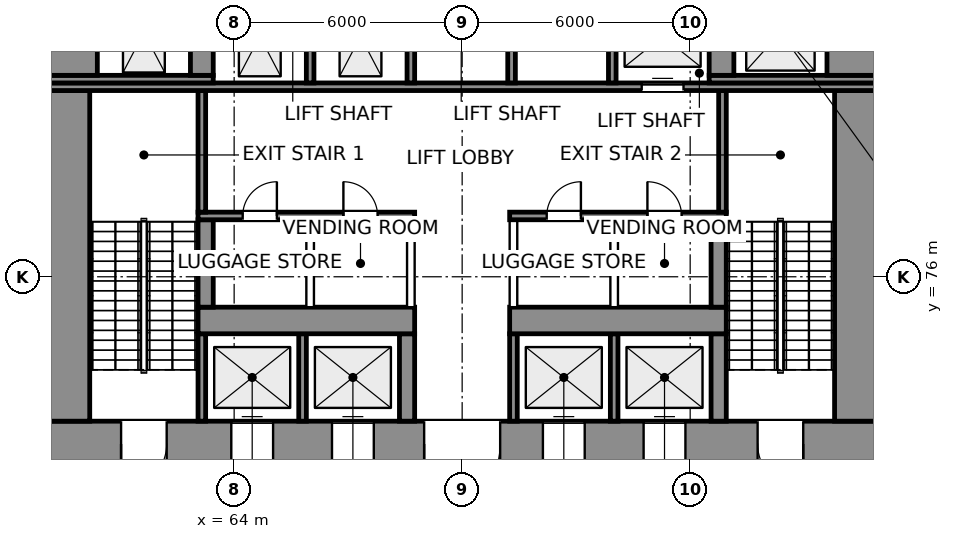
"""IFC4 building model, lengths in metres.
Left out: names, types, materials, properties, quantities, classifications, styles, units other than length and angle.
Written with IfcOpenShell. Run it as: python <this file> out.ifc"""

import sys

from ifc_helpers import new_model, si_unit, direction, frame, frame_2d, origin, place, context, subcontext, project, spatial, rectangle, extrude, element, fill, save


model = new_model("IFC4")
c1 = context("Model", 3, precision=1e-05, world=origin(), true_north=direction((0.0, 1.0)))
c2 = subcontext(c1, "Body", "Model", "MODEL_VIEW")
j1 = project(units=[si_unit("LENGTHUNIT", "METRE"), si_unit("PLANEANGLEUNIT", "RADIAN")], contexts=[c1])
p1 = place(None, origin())
s1 = spatial("IfcSite", under=j1, at=p1, CompositionType="ELEMENT")
p2 = place(p1, origin())
s2 = spatial("IfcBuilding", under=s1, at=p2, CompositionType="ELEMENT")
p3 = place(p2, frame((0.0, 0.0, 23.0)))
s3 = spatial("IfcBuildingStorey", under=s2, at=p3, CompositionType="ELEMENT", Elevation=23.0)
p4 = place(p3, frame((59.0, 71.6, 0.0), z_axis=(0.0, 0.0, 1.0), x_axis=(1.0, 0.0, 0.0)))
e1 = element("IfcWall", 1, at=p4, inside=s3, PredefinedType="SHEAR", context=c2, shape_type="SweptSolid", body=[
    extrude(rectangle(XDim=22.0, YDim=1.2, at=frame_2d((11.0, 0.0))), origin(), (0.0, 0.0, 1.0), 6.0),
])
p5 = place(p4, frame((2.025, 0.0, 0.0)))
e2 = element("IfcOpeningElement", 2, at=p5, cuts=e1, PredefinedType="OPENING", context=c2, shape_type="SweptSolid", body=[
    extrude(rectangle(XDim=1.2, YDim=2.1, at=frame_2d((0.6, 1.05))), frame((0.0, 0.61, 0.0), z_axis=(0.0, -1.0, 0.0), x_axis=(1.0, 0.0, 0.0)), (0.0, 0.0, 1.0), 1.22),
])
p6 = place(p4, frame((18.775, 0.0, 0.0)))
e3 = element("IfcOpeningElement", 3, at=p6, cuts=e1, PredefinedType="OPENING", context=c2, shape_type="SweptSolid", body=[
    extrude(rectangle(XDim=1.2, YDim=2.1, at=frame_2d((0.6, 1.05))), frame((0.0, 0.61, 0.0), z_axis=(0.0, -1.0, 0.0), x_axis=(1.0, 0.0, 0.0)), (0.0, 0.0, 1.0), 1.22),
])
p7 = place(p4, frame((10.0, 0.0, 0.0)))
e4 = element("IfcOpeningElement", 4, at=p7, cuts=e1, PredefinedType="OPENING", context=c2, shape_type="SweptSolid", body=[
    extrude(rectangle(XDim=2.0, YDim=2.1, at=frame_2d((1.0, 1.05))), frame((0.0, 0.61, 0.0), z_axis=(0.0, -1.0, 0.0), x_axis=(1.0, 0.0, 0.0)), (0.0, 0.0, 1.0), 1.22),
])
p8 = place(p4, frame((4.925, 0.0, 0.0)))
e5 = element("IfcOpeningElement", 5, at=p8, cuts=e1, PredefinedType="OPENING", context=c2, shape_type="SweptSolid", body=[
    extrude(rectangle(XDim=1.1, YDim=2.1, at=frame_2d((0.55, 1.05))), frame((0.0, 0.61, 0.0), z_axis=(0.0, -1.0, 0.0), x_axis=(1.0, 0.0, 0.0)), (0.0, 0.0, 1.0), 1.22),
])
p9 = place(p4, frame((7.575, 0.0, 0.0)))
e6 = element("IfcOpeningElement", 6, at=p9, cuts=e1, PredefinedType="OPENING", context=c2, shape_type="SweptSolid", body=[
    extrude(rectangle(XDim=1.1, YDim=2.1, at=frame_2d((0.55, 1.05))), frame((0.0, 0.61, 0.0), z_axis=(0.0, -1.0, 0.0), x_axis=(1.0, 0.0, 0.0)), (0.0, 0.0, 1.0), 1.22),
])
p10 = place(p4, frame((13.125, 0.0, 0.0)))
e7 = element("IfcOpeningElement", 7, at=p10, cuts=e1, PredefinedType="OPENING", context=c2, shape_type="SweptSolid", body=[
    extrude(rectangle(XDim=1.1, YDim=2.1, at=frame_2d((0.55, 1.05))), frame((0.0, 0.61, 0.0), z_axis=(0.0, -1.0, 0.0), x_axis=(1.0, 0.0, 0.0)), (0.0, 0.0, 1.0), 1.22),
])
p11 = place(p4, frame((15.775, 0.0, 0.0)))
e8 = element("IfcOpeningElement", 8, at=p11, cuts=e1, PredefinedType="OPENING", context=c2, shape_type="SweptSolid", body=[
    extrude(rectangle(XDim=1.1, YDim=2.1, at=frame_2d((0.55, 1.05))), frame((0.0, 0.61, 0.0), z_axis=(0.0, -1.0, 0.0), x_axis=(1.0, 0.0, 0.0)), (0.0, 0.0, 1.0), 1.22),
])
p12 = place(p3, frame((59.6, 72.2, 0.0), z_axis=(0.0, 0.0, 1.0), x_axis=(0.0, 1.0, 0.0)))
e9 = element("IfcWall", 9, at=p12, inside=s3, PredefinedType="SHEAR", context=c2, shape_type="SweptSolid", body=[
    extrude(rectangle(XDim=8.7, YDim=1.2, at=frame_2d((4.35, 0.0))), origin(), (0.0, 0.0, 1.0), 6.0),
])
for number, where, z_axis, x_axis in (
    (10, (63.15, 72.2, 0.0), (0.0, 0.0, 1.0), (0.0, 1.0, 0.0)),
    (11, (65.8, 72.2, 0.0), (0.0, 0.0, 1.0), (0.0, 1.0, 0.0)),
):
    element("IfcWall", number, at=place(p3, frame(where, z_axis=z_axis, x_axis=x_axis)), inside=s3, PredefinedType="SHEAR", context=c2, shape_type="SweptSolid", body=[
        extrude(rectangle(XDim=2.3, YDim=0.2, at=frame_2d((1.15, 0.0))), origin(), (0.0, 0.0, 1.0), 6.0),
    ])
p13 = place(p3, frame((68.55, 72.2, 0.0), z_axis=(0.0, 0.0, 1.0), x_axis=(0.0, 1.0, 0.0)))
e12 = element("IfcWall", 12, at=p13, inside=s3, PredefinedType="SHEAR", context=c2, shape_type="SweptSolid", body=[
    extrude(rectangle(XDim=2.3, YDim=0.4, at=frame_2d((1.15, 0.0))), origin(), (0.0, 0.0, 1.0), 6.0),
])
for number, where, z_axis, x_axis in (
    (13, (71.35, 72.2, 0.0), (0.0, 0.0, 1.0), (0.0, 1.0, 0.0)),
    (14, (74.0, 72.2, 0.0), (0.0, 0.0, 1.0), (0.0, 1.0, 0.0)),
):
    element("IfcWall", number, at=place(p3, frame(where, z_axis=z_axis, x_axis=x_axis)), inside=s3, PredefinedType="SHEAR", context=c2, shape_type="SweptSolid", body=[
        extrude(rectangle(XDim=2.3, YDim=0.2, at=frame_2d((1.15, 0.0))), origin(), (0.0, 0.0, 1.0), 6.0),
    ])
p14 = place(p3, frame((76.75, 72.2, 0.0), z_axis=(0.0, 0.0, 1.0), x_axis=(0.0, 1.0, 0.0)))
e15 = element("IfcWall", 15, at=p14, inside=s3, PredefinedType="SHEAR", context=c2, shape_type="SweptSolid", body=[
    extrude(rectangle(XDim=2.3, YDim=0.4, at=frame_2d((1.15, 0.0))), origin(), (0.0, 0.0, 1.0), 6.0),
])
p15 = place(p3, frame((80.4, 72.2, 0.0), z_axis=(0.0, 0.0, 1.0), x_axis=(0.0, 1.0, 0.0)))
e16 = element("IfcWall", 16, at=p15, inside=s3, PredefinedType="SHEAR", context=c2, shape_type="SweptSolid", body=[
    extrude(rectangle(XDim=8.7, YDim=1.2, at=frame_2d((4.35, 0.0))), origin(), (0.0, 0.0, 1.0), 6.0),
])
for number, where, z_axis, x_axis in (
    (17, (63.05, 74.85, 0.0), (0.0, 0.0, 1.0), (1.0, 0.0, 0.0)),
    (18, (71.25, 74.85, 0.0), (0.0, 0.0, 1.0), (1.0, 0.0, 0.0)),
):
    element("IfcWall", number, at=place(p3, frame(where, z_axis=z_axis, x_axis=x_axis)), inside=s3, PredefinedType="SHEAR", context=c2, shape_type="SweptSolid", body=[
        extrude(rectangle(XDim=5.7, YDim=0.7, at=frame_2d((2.85, 0.0))), origin(), (0.0, 0.0, 1.0), 6.0),
    ])
p16 = place(p3, frame((63.25, 75.2, 0.0), z_axis=(0.0, 0.0, 1.0), x_axis=(0.0, 1.0, 0.0)))
e19 = element("IfcWall", 19, at=p16, inside=s3, PredefinedType="SHEAR", context=c2, shape_type="SweptSolid", body=[
    extrude(rectangle(XDim=2.3, YDim=0.4, at=frame_2d((1.15, 0.0))), origin(), (0.0, 0.0, 1.0), 6.0),
])
for number, where, z_axis, x_axis in (
    (20, (66.0, 75.2, 0.0), (0.0, 0.0, 1.0), (0.0, 1.0, 0.0)),
    (21, (68.65, 75.2, 0.0), (0.0, 0.0, 1.0), (0.0, 1.0, 0.0)),
    (22, (71.35, 75.2, 0.0), (0.0, 0.0, 1.0), (0.0, 1.0, 0.0)),
    (23, (74.0, 75.2, 0.0), (0.0, 0.0, 1.0), (0.0, 1.0, 0.0)),
):
    element("IfcWall", number, at=place(p3, frame(where, z_axis=z_axis, x_axis=x_axis)), inside=s3, PredefinedType="PARTITIONING", context=c2, shape_type="SweptSolid", body=[
        extrude(rectangle(XDim=2.3, YDim=0.2, at=frame_2d((1.15, 0.0))), origin(), (0.0, 0.0, 1.0), 5.65),
    ])
p17 = place(p3, frame((76.75, 75.2, 0.0), z_axis=(0.0, 0.0, 1.0), x_axis=(0.0, 1.0, 0.0)))
e24 = element("IfcWall", 24, at=p17, inside=s3, PredefinedType="SHEAR", context=c2, shape_type="SweptSolid", body=[
    extrude(rectangle(XDim=2.3, YDim=0.4, at=frame_2d((1.15, 0.0))), origin(), (0.0, 0.0, 1.0), 6.0),
])
p18 = place(p3, frame((63.05, 77.6, 0.0), z_axis=(0.0, 0.0, 1.0), x_axis=(1.0, 0.0, 0.0)))
e25 = element("IfcWall", 25, at=p18, inside=s3, PredefinedType="SHEAR", context=c2, shape_type="SweptSolid", body=[
    extrude(rectangle(XDim=5.7, YDim=0.2, at=frame_2d((2.85, 0.0))), origin(), (0.0, 0.0, 1.0), 6.0),
])
p19 = place(p18, frame((1.175, 0.0, 0.0)))
e26 = element("IfcOpeningElement", 26, at=p19, cuts=e25, PredefinedType="OPENING", context=c2, shape_type="SweptSolid", body=[
    extrude(rectangle(XDim=0.9, YDim=2.1, at=frame_2d((0.45, 1.05))), frame((0.0, 0.11, 0.0), z_axis=(0.0, -1.0, 0.0), x_axis=(1.0, 0.0, 0.0)), (0.0, 0.0, 1.0), 0.22),
])
p20 = place(p18, frame((3.825, 0.0, 0.0)))
e27 = element("IfcOpeningElement", 27, at=p20, cuts=e25, PredefinedType="OPENING", context=c2, shape_type="SweptSolid", body=[
    extrude(rectangle(XDim=0.9, YDim=2.1, at=frame_2d((0.45, 1.05))), frame((0.0, 0.11, 0.0), z_axis=(0.0, -1.0, 0.0), x_axis=(1.0, 0.0, 0.0)), (0.0, 0.0, 1.0), 0.22),
])
p21 = place(p3, frame((71.25, 77.6, 0.0), z_axis=(0.0, 0.0, 1.0), x_axis=(1.0, 0.0, 0.0)))
e28 = element("IfcWall", 28, at=p21, inside=s3, PredefinedType="SHEAR", context=c2, shape_type="SweptSolid", body=[
    extrude(rectangle(XDim=5.7, YDim=0.2, at=frame_2d((2.85, 0.0))), origin(), (0.0, 0.0, 1.0), 6.0),
])
p22 = place(p21, frame((0.975, 0.0, 0.0)))
e29 = element("IfcOpeningElement", 29, at=p22, cuts=e28, PredefinedType="OPENING", context=c2, shape_type="SweptSolid", body=[
    extrude(rectangle(XDim=0.9, YDim=2.1, at=frame_2d((0.45, 1.05))), frame((0.0, 0.11, 0.0), z_axis=(0.0, -1.0, 0.0), x_axis=(1.0, 0.0, 0.0)), (0.0, 0.0, 1.0), 0.22),
])
p23 = place(p21, frame((3.625, 0.0, 0.0)))
e30 = element("IfcOpeningElement", 30, at=p23, cuts=e28, PredefinedType="OPENING", context=c2, shape_type="SweptSolid", body=[
    extrude(rectangle(XDim=0.9, YDim=2.1, at=frame_2d((0.45, 1.05))), frame((0.0, 0.11, 0.0), z_axis=(0.0, -1.0, 0.0), x_axis=(1.0, 0.0, 0.0)), (0.0, 0.0, 1.0), 0.22),
])
for number, where, z_axis, x_axis in (
    (31, (63.15, 77.7, 0.0), (0.0, 0.0, 1.0), (0.0, 1.0, 0.0)),
    (32, (76.85, 77.7, 0.0), (0.0, 0.0, 1.0), (0.0, 1.0, 0.0)),
):
    element("IfcWall", number, at=place(p3, frame(where, z_axis=z_axis, x_axis=x_axis)), inside=s3, PredefinedType="SHEAR", context=c2, shape_type="SweptSolid", body=[
        extrude(rectangle(XDim=3.2, YDim=0.2, at=frame_2d((1.6, 0.0))), origin(), (0.0, 0.0, 1.0), 6.0),
    ])
p24 = place(p3, frame((59.0, 81.0, 0.0), z_axis=(0.0, 0.0, 1.0), x_axis=(1.0, 0.0, 0.0)))
e33 = element("IfcWall", 33, at=p24, inside=s3, PredefinedType="SHEAR", context=c2, shape_type="SweptSolid", body=[
    extrude(rectangle(XDim=22.0, YDim=0.2, at=frame_2d((11.0, 0.0))), origin(), (0.0, 0.0, 1.0), 6.0),
])
p25 = place(p24, frame((15.725, 0.0, 0.0)))
e34 = element("IfcOpeningElement", 34, at=p25, cuts=e33, PredefinedType="OPENING", context=c2, shape_type="SweptSolid", body=[
    extrude(rectangle(XDim=1.1, YDim=2.1, at=frame_2d((0.55, 1.05))), frame((0.0, 0.11, 0.0), z_axis=(0.0, -1.0, 0.0), x_axis=(1.0, 0.0, 0.0)), (0.0, 0.0, 1.0), 0.22),
])
p26 = place(p3, frame((59.0, 81.2, 0.0), z_axis=(0.0, 0.0, 1.0), x_axis=(1.0, 0.0, 0.0)))
e35 = element("IfcWall", 35, at=p26, inside=s3, PredefinedType="SHEAR", context=c2, shape_type="SweptSolid", body=[
    extrude(rectangle(XDim=4.45, YDim=0.2, at=frame_2d((2.225, 0.0))), origin(), (0.0, 0.0, 1.0), 6.0),
])
for number, where, z_axis, x_axis in (
    (36, (66.0, 81.1, 0.0), (0.0, 0.0, 1.0), (0.0, 1.0, 0.0)),
    (37, (68.65, 81.1, 0.0), (0.0, 0.0, 1.0), (0.0, 1.0, 0.0)),
    (38, (71.3, 81.1, 0.0), (0.0, 0.0, 1.0), (0.0, 1.0, 0.0)),
    (39, (73.95, 81.1, 0.0), (0.0, 0.0, 1.0), (0.0, 1.0, 0.0)),
):
    element("IfcWall", number, at=place(p3, frame(where, z_axis=z_axis, x_axis=x_axis)), inside=s3, PredefinedType="SHEAR", context=c2, shape_type="SweptSolid", body=[
        extrude(rectangle(XDim=2.45, YDim=0.2, at=frame_2d((1.225, 0.0))), origin(), (0.0, 0.0, 1.0), 6.0),
    ])
p27 = place(p3, frame((76.5, 81.2, 0.0), z_axis=(0.0, 0.0, 1.0), x_axis=(1.0, 0.0, 0.0)))
e40 = element("IfcWall", 40, at=p27, inside=s3, PredefinedType="SHEAR", context=c2, shape_type="SweptSolid", body=[
    extrude(rectangle(XDim=4.5, YDim=0.2, at=frame_2d((2.25, 0.0))), origin(), (0.0, 0.0, 1.0), 6.0),
])
p28 = place(p3, frame((59.7, 81.3, 0.0), z_axis=(0.0, 0.0, 1.0), x_axis=(0.0, 1.0, 0.0)))
e41 = element("IfcWall", 41, at=p28, inside=s3, PredefinedType="SHEAR", context=c2, shape_type="SweptSolid", body=[
    extrude(rectangle(XDim=2.25, YDim=1.4, at=frame_2d((1.125, 0.0))), origin(), (0.0, 0.0, 1.0), 6.0),
])
p29 = place(p3, frame((63.15, 81.3, 0.0), z_axis=(0.0, 0.0, 1.0), x_axis=(0.0, 1.0, 0.0)))
e42 = element("IfcWall", 42, at=p29, inside=s3, PredefinedType="SHEAR", context=c2, shape_type="SweptSolid", body=[
    extrude(rectangle(XDim=2.25, YDim=0.6, at=frame_2d((1.125, 0.0))), origin(), (0.0, 0.0, 1.0), 6.0),
])
p30 = place(p3, frame((76.825, 81.3, 0.0), z_axis=(0.0, 0.0, 1.0), x_axis=(0.0, 1.0, 0.0)))
e43 = element("IfcWall", 43, at=p30, inside=s3, PredefinedType="SHEAR", context=c2, shape_type="SweptSolid", body=[
    extrude(rectangle(XDim=2.25, YDim=0.65, at=frame_2d((1.125, 0.0))), origin(), (0.0, 0.0, 1.0), 6.0),
])
p31 = place(p3, frame((80.3, 81.3, 0.0), z_axis=(0.0, 0.0, 1.0), x_axis=(0.0, 1.0, 0.0)))
e44 = element("IfcWall", 44, at=p31, inside=s3, PredefinedType="SHEAR", context=c2, shape_type="SweptSolid", body=[
    extrude(rectangle(XDim=2.25, YDim=1.4, at=frame_2d((1.125, 0.0))), origin(), (0.0, 0.0, 1.0), 6.0),
])
p32 = place(p5, frame((1.2, 0.0, 0.0), z_axis=(0.0, 0.0, 1.0), x_axis=(-1.0, 0.0, 0.0)))
e45 = element("IfcDoor", 45, at=p32, inside=s3, OperationType="SINGLE_SWING_RIGHT", PredefinedType="DOOR", context=c2, shape_type="SweptSolid", body=[
    extrude(rectangle(XDim=1.2, YDim=2.1, at=frame_2d((0.6, 1.05))), frame((0.0, 0.025, 0.0), z_axis=(0.0, -1.0, 0.0), x_axis=(1.0, 0.0, 0.0)), (0.0, 0.0, 1.0), 0.05),
])
fill(e2, e45)
p33 = place(p6, frame((1.2, 0.0, 0.0), z_axis=(0.0, 0.0, 1.0), x_axis=(-1.0, 0.0, 0.0)))
e46 = element("IfcDoor", 46, at=p33, inside=s3, OperationType="SINGLE_SWING_LEFT", PredefinedType="DOOR", context=c2, shape_type="SweptSolid", body=[
    extrude(rectangle(XDim=1.2, YDim=2.1, at=frame_2d((0.6, 1.05))), frame((0.0, 0.025, 0.0), z_axis=(0.0, -1.0, 0.0), x_axis=(1.0, 0.0, 0.0)), (0.0, 0.0, 1.0), 0.05),
])
fill(e3, e46)
p34 = place(p7, frame((2.0, 0.0, 0.0), z_axis=(0.0, 0.0, 1.0), x_axis=(-1.0, 0.0, 0.0)))
e47 = element("IfcDoor", 47, at=p34, inside=s3, OperationType="DOUBLE_DOOR_SINGLE_SWING", PredefinedType="DOOR", context=c2, shape_type="SweptSolid", body=[
    extrude(rectangle(XDim=2.0, YDim=2.1, at=frame_2d((1.0, 1.05))), frame((0.0, 0.025, 0.0), z_axis=(0.0, -1.0, 0.0), x_axis=(1.0, 0.0, 0.0)), (0.0, 0.0, 1.0), 0.05),
])
fill(e4, e47)
p35 = place(p25, origin())
e48 = element("IfcDoor", 48, at=p35, inside=s3, OperationType="DOUBLE_DOOR_SLIDING", PredefinedType="DOOR", context=c2, shape_type="SweptSolid", body=[
    extrude(rectangle(XDim=1.1, YDim=2.1, at=frame_2d((0.55, 1.05))), frame((0.0, 0.025, 0.0), z_axis=(0.0, -1.0, 0.0), x_axis=(1.0, 0.0, 0.0)), (0.0, 0.0, 1.0), 0.05),
])
fill(e34, e48)
p36 = place(p8, origin())
e49 = element("IfcDoor", 49, at=p36, inside=s3, OperationType="DOUBLE_DOOR_SLIDING", PredefinedType="DOOR", context=c2, shape_type="SweptSolid", body=[
    extrude(rectangle(XDim=1.1, YDim=2.1, at=frame_2d((0.55, 1.05))), frame((0.0, 0.025, 0.0), z_axis=(0.0, -1.0, 0.0), x_axis=(1.0, 0.0, 0.0)), (0.0, 0.0, 1.0), 0.05),
])
fill(e5, e49)
p37 = place(p9, origin())
e50 = element("IfcDoor", 50, at=p37, inside=s3, OperationType="DOUBLE_DOOR_SLIDING", PredefinedType="DOOR", context=c2, shape_type="SweptSolid", body=[
    extrude(rectangle(XDim=1.1, YDim=2.1, at=frame_2d((0.55, 1.05))), frame((0.0, 0.025, 0.0), z_axis=(0.0, -1.0, 0.0), x_axis=(1.0, 0.0, 0.0)), (0.0, 0.0, 1.0), 0.05),
])
fill(e6, e50)
p38 = place(p10, origin())
e51 = element("IfcDoor", 51, at=p38, inside=s3, OperationType="DOUBLE_DOOR_SLIDING", PredefinedType="DOOR", context=c2, shape_type="SweptSolid", body=[
    extrude(rectangle(XDim=1.1, YDim=2.1, at=frame_2d((0.55, 1.05))), frame((0.0, 0.025, 0.0), z_axis=(0.0, -1.0, 0.0), x_axis=(1.0, 0.0, 0.0)), (0.0, 0.0, 1.0), 0.05),
])
fill(e7, e51)
p39 = place(p11, origin())
e52 = element("IfcDoor", 52, at=p39, inside=s3, OperationType="DOUBLE_DOOR_SLIDING", PredefinedType="DOOR", context=c2, shape_type="SweptSolid", body=[
    extrude(rectangle(XDim=1.1, YDim=2.1, at=frame_2d((0.55, 1.05))), frame((0.0, 0.025, 0.0), z_axis=(0.0, -1.0, 0.0), x_axis=(1.0, 0.0, 0.0)), (0.0, 0.0, 1.0), 0.05),
])
fill(e8, e52)
p40 = place(p19, origin())
e53 = element("IfcDoor", 53, at=p40, inside=s3, OperationType="SINGLE_SWING_RIGHT", PredefinedType="DOOR", context=c2, shape_type="SweptSolid", body=[
    extrude(rectangle(XDim=0.9, YDim=2.1, at=frame_2d((0.45, 1.05))), frame((0.0, 0.025, 0.0), z_axis=(0.0, -1.0, 0.0), x_axis=(1.0, 0.0, 0.0)), (0.0, 0.0, 1.0), 0.05),
])
fill(e26, e53)
p41 = place(p20, origin())
e54 = element("IfcDoor", 54, at=p41, inside=s3, OperationType="SINGLE_SWING_LEFT", PredefinedType="DOOR", context=c2, shape_type="SweptSolid", body=[
    extrude(rectangle(XDim=0.9, YDim=2.1, at=frame_2d((0.45, 1.05))), frame((0.0, 0.025, 0.0), z_axis=(0.0, -1.0, 0.0), x_axis=(1.0, 0.0, 0.0)), (0.0, 0.0, 1.0), 0.05),
])
fill(e27, e54)
p42 = place(p22, origin())
e55 = element("IfcDoor", 55, at=p42, inside=s3, OperationType="SINGLE_SWING_RIGHT", PredefinedType="DOOR", context=c2, shape_type="SweptSolid", body=[
    extrude(rectangle(XDim=0.9, YDim=2.1, at=frame_2d((0.45, 1.05))), frame((0.0, 0.025, 0.0), z_axis=(0.0, -1.0, 0.0), x_axis=(1.0, 0.0, 0.0)), (0.0, 0.0, 1.0), 0.05),
])
fill(e29, e55)
p43 = place(p23, origin())
e56 = element("IfcDoor", 56, at=p43, inside=s3, OperationType="SINGLE_SWING_LEFT", PredefinedType="DOOR", context=c2, shape_type="SweptSolid", body=[
    extrude(rectangle(XDim=0.9, YDim=2.1, at=frame_2d((0.45, 1.05))), frame((0.0, 0.025, 0.0), z_axis=(0.0, -1.0, 0.0), x_axis=(1.0, 0.0, 0.0)), (0.0, 0.0, 1.0), 0.05),
])
fill(e30, e56)
save(model, sys.argv[1])
